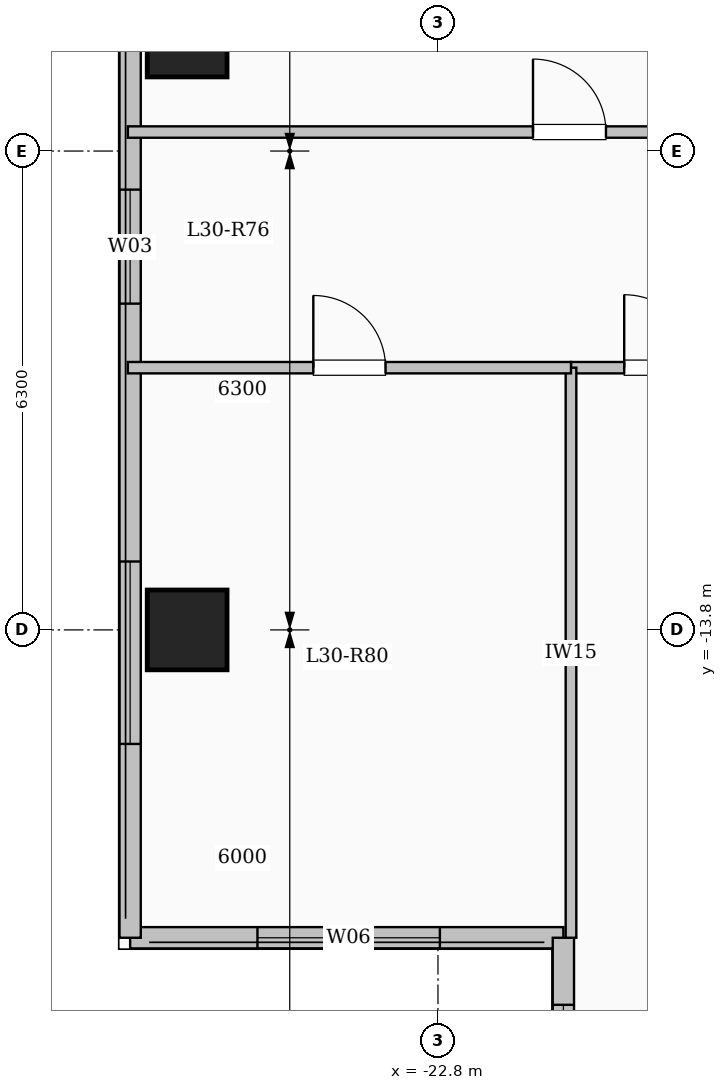
"""IFC4 building model, lengths in metres.
Left out: names, types, materials, properties, quantities, classifications, styles, units other than length and angle.
Written with IfcOpenShell. Run it as: python <this file> out.ifc"""

import sys

from ifc_helpers import new_model, si_unit, direction, frame, frame_2d, origin, origin_2d, place, context, subcontext, project, spatial, rectangle, extrude, element, fill, save


model = new_model("IFC4")
c1 = context("Model", 3, precision=1e-05, world=origin(), true_north=direction((0.0, 1.0)))
c2 = subcontext(c1, "Body", "Model", "MODEL_VIEW")
j1 = project(units=[si_unit("LENGTHUNIT", "METRE"), si_unit("PLANEANGLEUNIT", "RADIAN")], contexts=[c1])
p1 = place(None, origin())
s1 = spatial("IfcSite", under=j1, at=p1, CompositionType="ELEMENT")
p2 = place(p1, origin())
s2 = spatial("IfcBuilding", under=s1, at=p2, CompositionType="ELEMENT")
p3 = place(p2, frame((0.0, 0.0, 111.8)))
s3 = spatial("IfcBuildingStorey", under=s2, at=p3, CompositionType="ELEMENT", Elevation=111.8)
for number, where, z_axis, x_axis in (
    (1, (-26.1, -13.8, 0.0), (0.0, 0.0, 1.0), (1.0, 0.0, 0.0)),
    (2, (-26.1, -6.0, 0.0), (0.0, 0.0, 1.0), (1.0, 0.0, 0.0)),
):
    element("IfcColumn", number, at=place(p3, frame(where, z_axis=z_axis, x_axis=x_axis)), inside=s3, PredefinedType="COLUMN", context=c2, shape_type="SweptSolid", body=[
        extrude(rectangle(XDim=1.05, YDim=1.05, at=origin_2d()), origin(), (0.0, 0.0, 1.0), 3.35),
    ])
p4 = place(p3, frame((-21.15, -17.85, 0.0), z_axis=(0.0, 0.0, 1.0), x_axis=(-1.0, 0.0, 0.0)))
e3 = element("IfcWall", 3, at=p4, inside=s3, PredefinedType="SOLIDWALL", context=c2, shape_type="SweptSolid", body=[
    extrude(rectangle(XDim=5.7, YDim=0.28, at=frame_2d((2.85, 0.0))), origin(), (0.0, 0.0, 1.0), 3.1),
])
p5 = place(p4, frame((1.625, 0.0, 0.9)))
e4 = element("IfcOpeningElement", 4, at=p5, cuts=e3, PredefinedType="OPENING", context=c2, shape_type="SweptSolid", body=[
    extrude(rectangle(XDim=2.4, YDim=1.8, at=frame_2d((1.2, 0.9))), frame((0.0, 0.15, 0.0), z_axis=(0.0, -1.0, 0.0), x_axis=(1.0, 0.0, 0.0)), (0.0, 0.0, 1.0), 0.3),
])
p6 = place(p3, frame((-26.85, -17.85, 0.0), z_axis=(0.0, 0.0, 1.0), x_axis=(0.0, 1.0, 0.0)))
e5 = element("IfcWall", 5, at=p6, inside=s3, PredefinedType="SOLIDWALL", context=c2, shape_type="SweptSolid", body=[
    extrude(rectangle(XDim=35.7, YDim=0.28, at=frame_2d((17.85, 0.0))), origin(), (0.0, 0.0, 1.0), 3.1),
])
p7 = place(p6, frame((2.55, 0.0, 0.9)))
e6 = element("IfcOpeningElement", 6, at=p7, cuts=e5, PredefinedType="OPENING", context=c2, shape_type="SweptSolid", body=[
    extrude(rectangle(XDim=2.4, YDim=1.8, at=frame_2d((1.2, 0.9))), frame((0.0, 0.15, 0.0), z_axis=(0.0, -1.0, 0.0), x_axis=(1.0, 0.0, 0.0)), (0.0, 0.0, 1.0), 0.3),
])
p8 = place(p6, frame((8.343, 0.0, 0.9)))
e7 = element("IfcOpeningElement", 7, at=p8, cuts=e5, PredefinedType="OPENING", context=c2, shape_type="SweptSolid", body=[
    extrude(rectangle(XDim=1.5, YDim=1.65, at=frame_2d((0.75, 0.825))), frame((0.0, 0.15, 0.0), z_axis=(0.0, -1.0, 0.0), x_axis=(1.0, 0.0, 0.0)), (0.0, 0.0, 1.0), 0.3),
])
p9 = place(p6, frame((13.75, 0.0, 0.9)))
e8 = element("IfcOpeningElement", 8, at=p9, cuts=e5, PredefinedType="OPENING", context=c2, shape_type="SweptSolid", body=[
    extrude(rectangle(XDim=2.4, YDim=1.8, at=frame_2d((1.2, 0.9))), frame((0.0, 0.15, 0.0), z_axis=(0.0, -1.0, 0.0), x_axis=(1.0, 0.0, 0.0)), (0.0, 0.0, 1.0), 0.3),
])
p10 = place(p6, frame((20.175, 0.0, 0.9)))
e9 = element("IfcOpeningElement", 9, at=p10, cuts=e5, PredefinedType="OPENING", context=c2, shape_type="SweptSolid", body=[
    extrude(rectangle(XDim=1.8, YDim=1.65, at=frame_2d((0.9, 0.825))), frame((0.0, 0.15, 0.0), z_axis=(0.0, -1.0, 0.0), x_axis=(1.0, 0.0, 0.0)), (0.0, 0.0, 1.0), 0.3),
])
p11 = place(p6, frame((24.725, 0.0, 0.9)))
e10 = element("IfcOpeningElement", 10, at=p11, cuts=e5, PredefinedType="OPENING", context=c2, shape_type="SweptSolid", body=[
    extrude(rectangle(XDim=2.0, YDim=1.7, at=frame_2d((1.0, 0.85))), frame((0.0, 0.15, 0.0), z_axis=(0.0, -1.0, 0.0), x_axis=(1.0, 0.0, 0.0)), (0.0, 0.0, 1.0), 0.3),
])
p12 = place(p6, frame((28.975, 0.0, 0.95)))
e11 = element("IfcOpeningElement", 11, at=p12, cuts=e5, PredefinedType="OPENING", context=c2, shape_type="SweptSolid", body=[
    extrude(rectangle(XDim=1.0, YDim=1.5, at=frame_2d((0.5, 0.75))), frame((0.0, 0.15, 0.0), z_axis=(0.0, -1.0, 0.0), x_axis=(1.0, 0.0, 0.0)), (0.0, 0.0, 1.0), 0.3),
])
p13 = place(p6, frame((32.025, 0.0, 0.9)))
e12 = element("IfcOpeningElement", 12, at=p13, cuts=e5, PredefinedType="OPENING", context=c2, shape_type="SweptSolid", body=[
    extrude(rectangle(XDim=2.0, YDim=1.7, at=frame_2d((1.0, 0.85))), frame((0.0, 0.15, 0.0), z_axis=(0.0, -1.0, 0.0), x_axis=(1.0, 0.0, 0.0)), (0.0, 0.0, 1.0), 0.3),
])
p14 = place(p3, frame((-21.15, -22.05, 0.0), z_axis=(0.0, 0.0, 1.0), x_axis=(0.0, 1.0, 0.0)))
e13 = element("IfcWall", 13, at=p14, inside=s3, PredefinedType="SOLIDWALL", context=c2, shape_type="SweptSolid", body=[
    extrude(rectangle(XDim=4.2, YDim=0.28, at=frame_2d((2.1, 0.0))), origin(), (0.0, 0.0, 1.0), 3.1),
])
p15 = place(p14, frame((0.918, 0.0, 0.9)))
e14 = element("IfcOpeningElement", 14, at=p15, cuts=e13, PredefinedType="OPENING", context=c2, shape_type="SweptSolid", body=[
    extrude(rectangle(XDim=2.4, YDim=1.8, at=frame_2d((1.2, 0.9))), frame((0.0, 0.15, 0.0), z_axis=(0.0, -1.0, 0.0), x_axis=(1.0, 0.0, 0.0)), (0.0, 0.0, 1.0), 0.3),
])
p16 = place(p3, frame((-21.05, -10.35, 0.0), z_axis=(0.0, 0.0, 1.0), x_axis=(1.0, 0.0, 0.0)))
e15 = element("IfcWall", 15, at=p16, inside=s3, PredefinedType="PARTITIONING", context=c2, shape_type="SweptSolid", body=[
    extrude(rectangle(XDim=12.5, YDim=0.15, at=frame_2d((6.25, 0.0))), origin(), (0.0, 0.0, 1.0), 3.1),
])
p17 = place(p16, frame((0.7, 0.0, 0.0)))
e16 = element("IfcOpeningElement", 16, at=p17, cuts=e15, PredefinedType="OPENING", context=c2, shape_type="SweptSolid", body=[
    extrude(rectangle(XDim=0.96, YDim=2.15, at=frame_2d((0.48, 1.075))), frame((0.0, 0.085, 0.0), z_axis=(0.0, -1.0, 0.0), x_axis=(1.0, 0.0, 0.0)), (0.0, 0.0, 1.0), 0.17),
])
p18 = place(p16, frame((6.925, 0.0, 0.0)))
e17 = element("IfcOpeningElement", 17, at=p18, cuts=e15, PredefinedType="OPENING", context=c2, shape_type="SweptSolid", body=[
    extrude(rectangle(XDim=0.96, YDim=2.15, at=frame_2d((0.48, 1.075))), frame((0.0, 0.085, 0.0), z_axis=(0.0, -1.0, 0.0), x_axis=(1.0, 0.0, 0.0)), (0.0, 0.0, 1.0), 0.17),
])
p19 = place(p3, frame((-26.88, -7.25, 0.0), z_axis=(0.0, 0.0, 1.0), x_axis=(1.0, 0.0, 0.0)))
e18 = element("IfcWall", 18, at=p19, inside=s3, PredefinedType="PARTITIONING", context=c2, shape_type="SweptSolid", body=[
    extrude(rectangle(XDim=8.43, YDim=0.15, at=frame_2d((4.215, 0.0))), origin(), (0.0, 0.0, 1.0), 3.1),
])
p20 = place(p19, frame((5.33, 0.0, 0.0)))
e19 = element("IfcOpeningElement", 19, at=p20, cuts=e18, PredefinedType="OPENING", context=c2, shape_type="SweptSolid", body=[
    extrude(rectangle(XDim=0.96, YDim=2.15, at=frame_2d((0.48, 1.075))), frame((0.0, 0.085, 0.0), z_axis=(0.0, -1.0, 0.0), x_axis=(1.0, 0.0, 0.0)), (0.0, 0.0, 1.0), 0.17),
])
p21 = place(p3, frame((-21.05, -17.85, 0.0), z_axis=(0.0, 0.0, 1.0), x_axis=(0.0, 1.0, 0.0)))
e20 = element("IfcWall", 20, at=p21, inside=s3, PredefinedType="PARTITIONING", context=c2, shape_type="SweptSolid", body=[
    extrude(rectangle(XDim=7.5, YDim=0.14, at=frame_2d((3.75, 0.0))), origin(), (0.0, 0.0, 1.0), 3.1),
])
p22 = place(p3, frame((-26.88, -10.35, 0.0), z_axis=(0.0, 0.0, 1.0), x_axis=(1.0, 0.0, 0.0)))
e21 = element("IfcWall", 21, at=p22, inside=s3, PredefinedType="PARTITIONING", context=c2, shape_type="SweptSolid", body=[
    extrude(rectangle(XDim=5.83, YDim=0.15, at=frame_2d((2.915, 0.0))), origin(), (0.0, 0.0, 1.0), 3.1),
])
p23 = place(p22, frame((2.44, 0.0, 0.0)))
e22 = element("IfcOpeningElement", 22, at=p23, cuts=e21, PredefinedType="OPENING", context=c2, shape_type="SweptSolid", body=[
    extrude(rectangle(XDim=0.95, YDim=2.15, at=frame_2d((0.475, 1.075))), frame((0.0, 0.085, 0.0), z_axis=(0.0, -1.0, 0.0), x_axis=(1.0, 0.0, 0.0)), (0.0, 0.0, 1.0), 0.17),
])
p24 = place(p5, origin())
e23 = element("IfcWindow", 23, at=p24, inside=s3, PartitioningType="SINGLE_PANEL", PredefinedType="WINDOW", context=c2, shape_type="SweptSolid", body=[
    extrude(rectangle(XDim=2.4, YDim=1.8, at=frame_2d((1.2, 0.9))), frame((0.0, 0.03, 0.0), z_axis=(0.0, -1.0, 0.0), x_axis=(1.0, 0.0, 0.0)), (0.0, 0.0, 1.0), 0.06),
])
fill(e4, e23)
p25 = place(p7, origin())
e24 = element("IfcWindow", 24, at=p25, inside=s3, PartitioningType="SINGLE_PANEL", PredefinedType="WINDOW", context=c2, shape_type="SweptSolid", body=[
    extrude(rectangle(XDim=2.4, YDim=1.8, at=frame_2d((1.2, 0.9))), frame((0.0, 0.03, 0.0), z_axis=(0.0, -1.0, 0.0), x_axis=(1.0, 0.0, 0.0)), (0.0, 0.0, 1.0), 0.06),
])
fill(e6, e24)
p26 = place(p8, origin())
e25 = element("IfcWindow", 25, at=p26, inside=s3, PartitioningType="SINGLE_PANEL", PredefinedType="WINDOW", context=c2, shape_type="SweptSolid", body=[
    extrude(rectangle(XDim=1.5, YDim=1.65, at=frame_2d((0.75, 0.825))), frame((0.0, 0.03, 0.0), z_axis=(0.0, -1.0, 0.0), x_axis=(1.0, 0.0, 0.0)), (0.0, 0.0, 1.0), 0.06),
])
fill(e7, e25)
p27 = place(p15, origin())
e26 = element("IfcWindow", 26, at=p27, inside=s3, PartitioningType="SINGLE_PANEL", PredefinedType="WINDOW", context=c2, shape_type="SweptSolid", body=[
    extrude(rectangle(XDim=2.4, YDim=1.8, at=frame_2d((1.2, 0.9))), frame((0.0, 0.03, 0.0), z_axis=(0.0, -1.0, 0.0), x_axis=(1.0, 0.0, 0.0)), (0.0, 0.0, 1.0), 0.06),
])
fill(e14, e26)
p28 = place(p17, origin())
e27 = element("IfcDoor", 27, at=p28, inside=s3, OperationType="SINGLE_SWING_LEFT", PredefinedType="DOOR", context=c2, shape_type="SweptSolid", body=[
    extrude(rectangle(XDim=0.96, YDim=2.15, at=frame_2d((0.48, 1.075))), frame((0.0, 0.025, 0.0), z_axis=(0.0, -1.0, 0.0), x_axis=(1.0, 0.0, 0.0)), (0.0, 0.0, 1.0), 0.05),
])
fill(e16, e27)
p29 = place(p23, origin())
e28 = element("IfcDoor", 28, at=p29, inside=s3, OperationType="SINGLE_SWING_LEFT", PredefinedType="DOOR", context=c2, shape_type="SweptSolid", body=[
    extrude(rectangle(XDim=0.95, YDim=2.15, at=frame_2d((0.475, 1.075))), frame((0.0, 0.025, 0.0), z_axis=(0.0, -1.0, 0.0), x_axis=(1.0, 0.0, 0.0)), (0.0, 0.0, 1.0), 0.05),
])
fill(e22, e28)
p30 = place(p20, origin())
e29 = element("IfcDoor", 29, at=p30, inside=s3, OperationType="SINGLE_SWING_LEFT", PredefinedType="DOOR", context=c2, shape_type="SweptSolid", body=[
    extrude(rectangle(XDim=0.96, YDim=2.15, at=frame_2d((0.48, 1.075))), frame((0.0, 0.025, 0.0), z_axis=(0.0, -1.0, 0.0), x_axis=(1.0, 0.0, 0.0)), (0.0, 0.0, 1.0), 0.05),
])
fill(e19, e29)
save(model, sys.argv[1])
